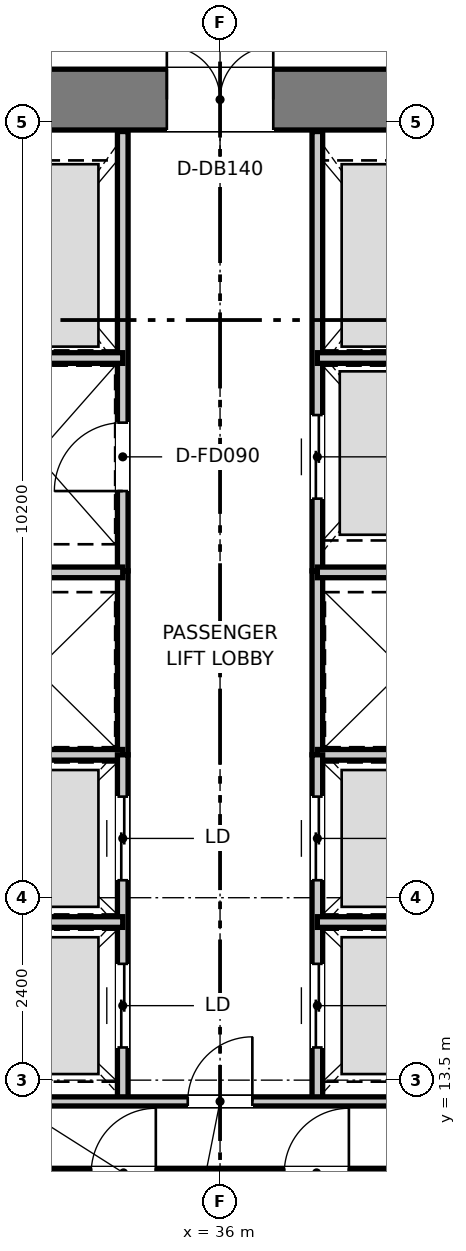
"""IFC4 building model, lengths in metres.
Left out: names, types, materials, properties, quantities, classifications, styles, units other than length and angle.
Written with IfcOpenShell. Run it as: python <this file> out.ifc"""

import sys

from ifc_helpers import new_model, si_unit, direction, frame, frame_2d, origin, place, context, subcontext, project, spatial, rectangle, extrude, element, fill, save


model = new_model("IFC4")
c1 = context("Model", 3, precision=1e-05, world=origin(), true_north=direction((0.0, 1.0)))
c2 = subcontext(c1, "Body", "Model", "MODEL_VIEW")
j1 = project(units=[si_unit("LENGTHUNIT", "METRE"), si_unit("PLANEANGLEUNIT", "RADIAN")], contexts=[c1])
p1 = place(None, origin())
s1 = spatial("IfcSite", under=j1, at=p1, CompositionType="ELEMENT")
p2 = place(p1, origin())
s2 = spatial("IfcBuilding", under=s1, at=p2, CompositionType="ELEMENT")
p3 = place(p2, frame((0.0, 0.0, 25.0)))
s3 = spatial("IfcBuildingStorey", under=s2, at=p3, CompositionType="ELEMENT", Elevation=25.0)
p4 = place(p3, frame((28.08, 26.4, 0.0), z_axis=(0.0, 0.0, 1.0), x_axis=(1.0, 0.0, 0.0)))
e1 = element("IfcWall", 1, at=p4, inside=s3, PredefinedType="SHEAR", context=c2, shape_type="SweptSolid", body=[
    extrude(rectangle(XDim=15.84, YDim=0.8, at=frame_2d((7.92, 0.0))), origin(), (0.0, 0.0, 1.0), 3.95),
])
p5 = place(p4, frame((7.22, 0.0, 0.0)))
e2 = element("IfcOpeningElement", 2, at=p5, cuts=e1, PredefinedType="OPENING", context=c2, shape_type="SweptSolid", body=[
    extrude(rectangle(XDim=1.4, YDim=2.2, at=frame_2d((0.7, 1.1))), frame((0.0, 0.41, 0.0), z_axis=(0.0, -1.0, 0.0), x_axis=(1.0, 0.0, 0.0)), (0.0, 0.0, 1.0), 0.82),
])
p6 = place(p4, frame((1.775, 0.0, 0.0)))
e3 = element("IfcOpeningElement", 3, at=p6, cuts=e1, PredefinedType="OPENING", context=c2, shape_type="SweptSolid", body=[
    extrude(rectangle(XDim=1.05, YDim=2.1, at=frame_2d((0.525, 1.05))), frame((0.0, 0.41, 0.0), z_axis=(0.0, -1.0, 0.0), x_axis=(1.0, 0.0, 0.0)), (0.0, 0.0, 1.0), 0.82),
])
p7 = place(p4, frame((13.015, 0.0, 0.0)))
e4 = element("IfcOpeningElement", 4, at=p7, cuts=e1, PredefinedType="OPENING", context=c2, shape_type="SweptSolid", body=[
    extrude(rectangle(XDim=1.05, YDim=2.1, at=frame_2d((0.525, 1.05))), frame((0.0, 0.41, 0.0), z_axis=(0.0, -1.0, 0.0), x_axis=(1.0, 0.0, 0.0)), (0.0, 0.0, 1.0), 0.82),
])
p8 = place(p3, frame((34.72, 20.2, 0.0), z_axis=(0.0, 0.0, 1.0), x_axis=(0.0, 1.0, 0.0)))
e5 = element("IfcWall", 5, at=p8, inside=s3, PredefinedType="PARTITIONING", context=c2, shape_type="SweptSolid", body=[
    extrude(rectangle(XDim=5.78, YDim=0.14, at=frame_2d((2.89, 0.0))), origin(), (0.0, 0.0, 1.0), 2.47),
])
p9 = place(p8, frame((1.05, 0.0, 0.0)))
e6 = element("IfcOpeningElement", 6, at=p9, cuts=e5, PredefinedType="OPENING", context=c2, shape_type="SweptSolid", body=[
    extrude(rectangle(XDim=0.9, YDim=2.1, at=frame_2d((0.45, 1.05))), frame((0.0, 0.08, 0.0), z_axis=(0.0, -1.0, 0.0), x_axis=(1.0, 0.0, 0.0)), (0.0, 0.0, 1.0), 0.16),
])
p10 = place(p3, frame((37.28, 20.2, 0.0), z_axis=(0.0, 0.0, 1.0), x_axis=(0.0, 1.0, 0.0)))
e7 = element("IfcWall", 7, at=p10, inside=s3, PredefinedType="PARTITIONING", context=c2, shape_type="SweptSolid", body=[
    extrude(rectangle(XDim=5.78, YDim=0.14, at=frame_2d((2.89, 0.0))), origin(), (0.0, 0.0, 1.0), 2.47),
])
p11 = place(p10, frame((0.95, 0.0, 0.0)))
e8 = element("IfcOpeningElement", 8, at=p11, cuts=e7, PredefinedType="OPENING", context=c2, shape_type="SweptSolid", body=[
    extrude(rectangle(XDim=1.1, YDim=2.15, at=frame_2d((0.55, 1.075))), frame((0.0, 0.08, 0.0), z_axis=(0.0, -1.0, 0.0), x_axis=(1.0, 0.0, 0.0)), (0.0, 0.0, 1.0), 0.16),
])
for number, where, z_axis, x_axis in (
    (9, (32.45, 23.0, 0.0), (0.0, 0.0, 1.0), (1.0, 0.0, 0.0)),
    (10, (37.28, 23.0, 0.0), (0.0, 0.0, 1.0), (1.0, 0.0, 0.0)),
):
    element("IfcWall", number, at=place(p3, frame(where, z_axis=z_axis, x_axis=x_axis)), inside=s3, PredefinedType="PARTITIONING", context=c2, shape_type="SweptSolid", body=[
        extrude(rectangle(XDim=2.27, YDim=0.14, at=frame_2d((1.135, 0.0))), origin(), (0.0, 0.0, 1.0), 2.47),
    ])
for number, where, z_axis, x_axis in (
    (11, (34.72, 17.78, 0.0), (0.0, 0.0, 1.0), (0.0, 1.0, 0.0)),
    (12, (37.28, 17.78, 0.0), (0.0, 0.0, 1.0), (0.0, 1.0, 0.0)),
):
    element("IfcWall", number, at=place(p3, frame(where, z_axis=z_axis, x_axis=x_axis)), inside=s3, PredefinedType="PARTITIONING", context=c2, shape_type="SweptSolid", body=[
        extrude(rectangle(XDim=2.42, YDim=0.14, at=frame_2d((1.21, 0.0))), origin(), (0.0, 0.0, 1.0), 3.67),
    ])
for number, where, z_axis, x_axis in (
    (13, (32.45, 17.78, 0.0), (0.0, 0.0, 1.0), (1.0, 0.0, 0.0)),
    (14, (32.45, 20.18, 0.0), (0.0, 0.0, 1.0), (1.0, 0.0, 0.0)),
    (15, (37.28, 17.78, 0.0), (0.0, 0.0, 1.0), (1.0, 0.0, 0.0)),
    (16, (37.28, 20.18, 0.0), (0.0, 0.0, 1.0), (1.0, 0.0, 0.0)),
):
    element("IfcWall", number, at=place(p3, frame(where, z_axis=z_axis, x_axis=x_axis)), inside=s3, PredefinedType="PARTITIONING", context=c2, shape_type="SweptSolid", body=[
        extrude(rectangle(XDim=2.27, YDim=0.14, at=frame_2d((1.135, 0.0))), origin(), (0.0, 0.0, 1.0), 3.67),
    ])
p12 = place(p3, frame((34.72, 13.22, 0.0), z_axis=(0.0, 0.0, 1.0), x_axis=(0.0, 1.0, 0.0)))
e17 = element("IfcWall", 17, at=p12, inside=s3, PredefinedType="PARTITIONING", context=c2, shape_type="SweptSolid", body=[
    extrude(rectangle(XDim=4.56, YDim=0.14, at=frame_2d((2.28, 0.0))), origin(), (0.0, 0.0, 1.0), 3.67),
])
p13 = place(p12, frame((0.71, 0.0, 0.0)))
e18 = element("IfcOpeningElement", 18, at=p13, cuts=e17, PredefinedType="OPENING", context=c2, shape_type="SweptSolid", body=[
    extrude(rectangle(XDim=1.1, YDim=2.15, at=frame_2d((0.55, 1.075))), frame((0.0, 0.08, 0.0), z_axis=(0.0, -1.0, 0.0), x_axis=(1.0, 0.0, 0.0)), (0.0, 0.0, 1.0), 0.16),
])
p14 = place(p12, frame((2.91, 0.0, 0.0)))
e19 = element("IfcOpeningElement", 19, at=p14, cuts=e17, PredefinedType="OPENING", context=c2, shape_type="SweptSolid", body=[
    extrude(rectangle(XDim=1.1, YDim=2.15, at=frame_2d((0.55, 1.075))), frame((0.0, 0.08, 0.0), z_axis=(0.0, -1.0, 0.0), x_axis=(1.0, 0.0, 0.0)), (0.0, 0.0, 1.0), 0.16),
])
p15 = place(p3, frame((32.45, 15.58, 0.0), z_axis=(0.0, 0.0, 1.0), x_axis=(1.0, 0.0, 0.0)))
e20 = element("IfcWall", 20, at=p15, inside=s3, PredefinedType="PARTITIONING", context=c2, shape_type="SweptSolid", body=[
    extrude(rectangle(XDim=2.27, YDim=0.14, at=frame_2d((1.135, 0.0))), origin(), (0.0, 0.0, 1.0), 3.67),
])
p16 = place(p3, frame((37.28, 13.22, 0.0), z_axis=(0.0, 0.0, 1.0), x_axis=(0.0, 1.0, 0.0)))
e21 = element("IfcWall", 21, at=p16, inside=s3, PredefinedType="PARTITIONING", context=c2, shape_type="SweptSolid", body=[
    extrude(rectangle(XDim=4.56, YDim=0.14, at=frame_2d((2.28, 0.0))), origin(), (0.0, 0.0, 1.0), 3.67),
])
p17 = place(p16, frame((0.71, 0.0, 0.0)))
e22 = element("IfcOpeningElement", 22, at=p17, cuts=e21, PredefinedType="OPENING", context=c2, shape_type="SweptSolid", body=[
    extrude(rectangle(XDim=1.1, YDim=2.15, at=frame_2d((0.55, 1.075))), frame((0.0, 0.08, 0.0), z_axis=(0.0, -1.0, 0.0), x_axis=(1.0, 0.0, 0.0)), (0.0, 0.0, 1.0), 0.16),
])
p18 = place(p16, frame((2.91, 0.0, 0.0)))
e23 = element("IfcOpeningElement", 23, at=p18, cuts=e21, PredefinedType="OPENING", context=c2, shape_type="SweptSolid", body=[
    extrude(rectangle(XDim=1.1, YDim=2.15, at=frame_2d((0.55, 1.075))), frame((0.0, 0.08, 0.0), z_axis=(0.0, -1.0, 0.0), x_axis=(1.0, 0.0, 0.0)), (0.0, 0.0, 1.0), 0.16),
])
p19 = place(p3, frame((37.28, 15.58, 0.0), z_axis=(0.0, 0.0, 1.0), x_axis=(1.0, 0.0, 0.0)))
e24 = element("IfcWall", 24, at=p19, inside=s3, PredefinedType="PARTITIONING", context=c2, shape_type="SweptSolid", body=[
    extrude(rectangle(XDim=2.27, YDim=0.14, at=frame_2d((1.135, 0.0))), origin(), (0.0, 0.0, 1.0), 3.67),
])
p20 = place(p3, frame((32.21, 13.22, 0.0), z_axis=(0.0, 0.0, 1.0), x_axis=(1.0, 0.0, 0.0)))
e25 = element("IfcWall", 25, at=p20, inside=s3, PredefinedType="PARTITIONING", context=c2, shape_type="SweptSolid", body=[
    extrude(rectangle(XDim=7.58, YDim=0.12, at=frame_2d((3.79, 0.0))), origin(), (0.0, 0.0, 1.0), 3.67),
])
p21 = place(p20, frame((3.365, 0.0, 0.0)))
e26 = element("IfcOpeningElement", 26, at=p21, cuts=e25, PredefinedType="OPENING", context=c2, shape_type="SweptSolid", body=[
    extrude(rectangle(XDim=0.85, YDim=2.1, at=frame_2d((0.425, 1.05))), frame((0.0, 0.07, 0.0), z_axis=(0.0, -1.0, 0.0), x_axis=(1.0, 0.0, 0.0)), (0.0, 0.0, 1.0), 0.14),
])
p22 = place(p3, frame((32.21, 12.28, 0.0), z_axis=(0.0, 0.0, 1.0), x_axis=(1.0, 0.0, 0.0)))
e27 = element("IfcWall", 27, at=p22, inside=s3, PredefinedType="PARTITIONING", context=c2, shape_type="SweptSolid", body=[
    extrude(rectangle(XDim=7.58, YDim=0.12, at=frame_2d((3.79, 0.0))), origin(), (0.0, 0.0, 1.0), 3.67),
])
p23 = place(p22, frame((0.205, 0.0, 0.0)))
e28 = element("IfcOpeningElement", 28, at=p23, cuts=e27, PredefinedType="OPENING", context=c2, shape_type="SweptSolid", body=[
    extrude(rectangle(XDim=0.85, YDim=2.1, at=frame_2d((0.425, 1.05))), frame((0.0, 0.07, 0.0), z_axis=(0.0, -1.0, 0.0), x_axis=(1.0, 0.0, 0.0)), (0.0, 0.0, 1.0), 0.14),
])
p24 = place(p22, frame((2.095, 0.0, 0.0)))
e29 = element("IfcOpeningElement", 29, at=p24, cuts=e27, PredefinedType="OPENING", context=c2, shape_type="SweptSolid", body=[
    extrude(rectangle(XDim=0.85, YDim=2.1, at=frame_2d((0.425, 1.05))), frame((0.0, 0.07, 0.0), z_axis=(0.0, -1.0, 0.0), x_axis=(1.0, 0.0, 0.0)), (0.0, 0.0, 1.0), 0.14),
])
p25 = place(p22, frame((4.635, 0.0, 0.0)))
e30 = element("IfcOpeningElement", 30, at=p25, cuts=e27, PredefinedType="OPENING", context=c2, shape_type="SweptSolid", body=[
    extrude(rectangle(XDim=0.85, YDim=2.1, at=frame_2d((0.425, 1.05))), frame((0.0, 0.07, 0.0), z_axis=(0.0, -1.0, 0.0), x_axis=(1.0, 0.0, 0.0)), (0.0, 0.0, 1.0), 0.14),
])
p26 = place(p22, frame((6.525, 0.0, 0.0)))
e31 = element("IfcOpeningElement", 31, at=p26, cuts=e27, PredefinedType="OPENING", context=c2, shape_type="SweptSolid", body=[
    extrude(rectangle(XDim=0.85, YDim=2.1, at=frame_2d((0.425, 1.05))), frame((0.0, 0.07, 0.0), z_axis=(0.0, -1.0, 0.0), x_axis=(1.0, 0.0, 0.0)), (0.0, 0.0, 1.0), 0.14),
])
p27 = place(p5, origin())
e32 = element("IfcDoor", 32, at=p27, inside=s3, OperationType="DOUBLE_DOOR_SINGLE_SWING", PredefinedType="DOOR", context=c2, shape_type="SweptSolid", body=[
    extrude(rectangle(XDim=1.4, YDim=2.2, at=frame_2d((0.7, 1.1))), frame((0.0, 0.025, 0.0), z_axis=(0.0, -1.0, 0.0), x_axis=(1.0, 0.0, 0.0)), (0.0, 0.0, 1.0), 0.05),
])
fill(e2, e32)
p28 = place(p9, origin())
e33 = element("IfcDoor", 33, at=p28, inside=s3, OperationType="SINGLE_SWING_LEFT", PredefinedType="DOOR", context=c2, shape_type="SweptSolid", body=[
    extrude(rectangle(XDim=0.9, YDim=2.1, at=frame_2d((0.45, 1.05))), frame((0.0, 0.025, 0.0), z_axis=(0.0, -1.0, 0.0), x_axis=(1.0, 0.0, 0.0)), (0.0, 0.0, 1.0), 0.05),
])
fill(e6, e33)
p29 = place(p11, origin())
e34 = element("IfcDoor", 34, at=p29, inside=s3, OperationType="DOUBLE_DOOR_SLIDING", PredefinedType="DOOR", context=c2, shape_type="SweptSolid", body=[
    extrude(rectangle(XDim=1.1, YDim=2.15, at=frame_2d((0.55, 1.075))), frame((0.0, 0.025, 0.0), z_axis=(0.0, -1.0, 0.0), x_axis=(1.0, 0.0, 0.0)), (0.0, 0.0, 1.0), 0.05),
])
fill(e8, e34)
p30 = place(p13, origin())
e35 = element("IfcDoor", 35, at=p30, inside=s3, OperationType="DOUBLE_DOOR_SLIDING", PredefinedType="DOOR", context=c2, shape_type="SweptSolid", body=[
    extrude(rectangle(XDim=1.1, YDim=2.15, at=frame_2d((0.55, 1.075))), frame((0.0, 0.025, 0.0), z_axis=(0.0, -1.0, 0.0), x_axis=(1.0, 0.0, 0.0)), (0.0, 0.0, 1.0), 0.05),
])
fill(e18, e35)
p31 = place(p14, origin())
e36 = element("IfcDoor", 36, at=p31, inside=s3, OperationType="DOUBLE_DOOR_SLIDING", PredefinedType="DOOR", context=c2, shape_type="SweptSolid", body=[
    extrude(rectangle(XDim=1.1, YDim=2.15, at=frame_2d((0.55, 1.075))), frame((0.0, 0.025, 0.0), z_axis=(0.0, -1.0, 0.0), x_axis=(1.0, 0.0, 0.0)), (0.0, 0.0, 1.0), 0.05),
])
fill(e19, e36)
p32 = place(p17, origin())
e37 = element("IfcDoor", 37, at=p32, inside=s3, OperationType="DOUBLE_DOOR_SLIDING", PredefinedType="DOOR", context=c2, shape_type="SweptSolid", body=[
    extrude(rectangle(XDim=1.1, YDim=2.15, at=frame_2d((0.55, 1.075))), frame((0.0, 0.025, 0.0), z_axis=(0.0, -1.0, 0.0), x_axis=(1.0, 0.0, 0.0)), (0.0, 0.0, 1.0), 0.05),
])
fill(e22, e37)
p33 = place(p18, origin())
e38 = element("IfcDoor", 38, at=p33, inside=s3, OperationType="DOUBLE_DOOR_SLIDING", PredefinedType="DOOR", context=c2, shape_type="SweptSolid", body=[
    extrude(rectangle(XDim=1.1, YDim=2.15, at=frame_2d((0.55, 1.075))), frame((0.0, 0.025, 0.0), z_axis=(0.0, -1.0, 0.0), x_axis=(1.0, 0.0, 0.0)), (0.0, 0.0, 1.0), 0.05),
])
fill(e23, e38)
p34 = place(p21, origin())
e39 = element("IfcDoor", 39, at=p34, inside=s3, OperationType="SINGLE_SWING_RIGHT", PredefinedType="DOOR", context=c2, shape_type="SweptSolid", body=[
    extrude(rectangle(XDim=0.85, YDim=2.1, at=frame_2d((0.425, 1.05))), frame((0.0, 0.025, 0.0), z_axis=(0.0, -1.0, 0.0), x_axis=(1.0, 0.0, 0.0)), (0.0, 0.0, 1.0), 0.05),
])
fill(e26, e39)
p35 = place(p24, origin())
e40 = element("IfcDoor", 40, at=p35, inside=s3, OperationType="SINGLE_SWING_RIGHT", PredefinedType="DOOR", context=c2, shape_type="SweptSolid", body=[
    extrude(rectangle(XDim=0.85, YDim=2.1, at=frame_2d((0.425, 1.05))), frame((0.0, 0.025, 0.0), z_axis=(0.0, -1.0, 0.0), x_axis=(1.0, 0.0, 0.0)), (0.0, 0.0, 1.0), 0.05),
])
fill(e29, e40)
p36 = place(p25, origin())
e41 = element("IfcDoor", 41, at=p36, inside=s3, OperationType="SINGLE_SWING_RIGHT", PredefinedType="DOOR", context=c2, shape_type="SweptSolid", body=[
    extrude(rectangle(XDim=0.85, YDim=2.1, at=frame_2d((0.425, 1.05))), frame((0.0, 0.025, 0.0), z_axis=(0.0, -1.0, 0.0), x_axis=(1.0, 0.0, 0.0)), (0.0, 0.0, 1.0), 0.05),
])
fill(e30, e41)
save(model, sys.argv[1])
